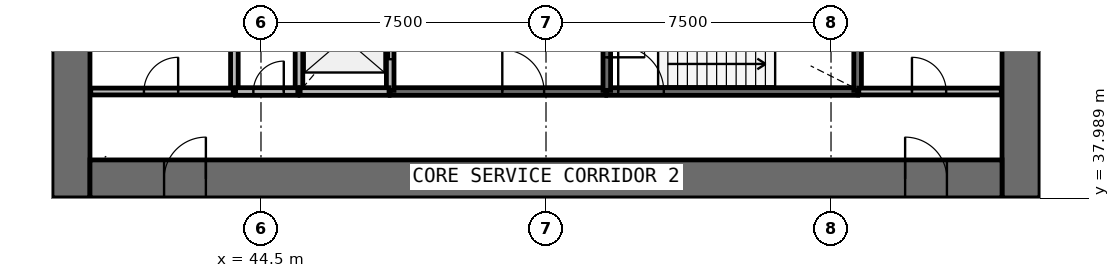
"""IFC4 building model, lengths in metres.
Left out: names, types, materials, properties, quantities, classifications, styles, units other than length and angle.
Written with IfcOpenShell. Run it as: python <this file> out.ifc"""

import sys

from ifc_helpers import new_model, si_unit, direction, frame, frame_2d, origin, place, context, subcontext, project, spatial, rectangle, extrude, source, transform, mapped, element, fill, save


model = new_model("IFC4")
c1 = context("Model", 3, precision=1e-05, world=origin(), true_north=direction((0.0, 1.0)))
c2 = subcontext(c1, "Body", "Model", "MODEL_VIEW")
j1 = project(units=[si_unit("LENGTHUNIT", "METRE"), si_unit("PLANEANGLEUNIT", "RADIAN")], contexts=[c1])
p1 = place(None, origin())
s1 = spatial("IfcSite", under=j1, at=p1, CompositionType="ELEMENT")
p2 = place(p1, origin())
s2 = spatial("IfcBuilding", under=s1, at=p2, CompositionType="ELEMENT")
p3 = place(p2, frame((0.0, 0.0, 57.8)))
s3 = spatial("IfcBuildingStorey", under=s2, at=p3, CompositionType="ELEMENT", Elevation=57.8)
p4 = place(p3, frame((64.5, 38.0, 0.0), z_axis=(0.0, 0.0, 1.0), x_axis=(0.0, 1.0, 0.0)))
e1 = element("IfcWall", 1, at=p4, inside=s3, PredefinedType="SHEAR", context=c2, shape_type="SweptSolid", body=[
    extrude(rectangle(XDim=20.0, YDim=1.0, at=frame_2d((10.0, 0.0))), origin(), (0.0, 0.0, 1.0), 4.4),
])
p5 = place(p4, frame((9.1, 0.0, 0.0)))
e2 = element("IfcOpeningElement", 2, at=p5, cuts=e1, PredefinedType="OPENING", context=c2, shape_type="SweptSolid", body=[
    extrude(rectangle(XDim=1.8, YDim=2.1, at=frame_2d((0.9, 1.05))), frame((0.0, 0.51, 0.0), z_axis=(0.0, -1.0, 0.0), x_axis=(1.0, 0.0, 0.0)), (0.0, 0.0, 1.0), 1.02),
])
p6 = place(p3, frame((39.5, 58.0, 0.0), z_axis=(0.0, 0.0, 1.0), x_axis=(0.0, -1.0, 0.0)))
e3 = element("IfcWall", 3, at=p6, inside=s3, PredefinedType="SHEAR", context=c2, shape_type="SweptSolid", body=[
    extrude(rectangle(XDim=20.0, YDim=1.0, at=frame_2d((10.0, 0.0))), origin(), (0.0, 0.0, 1.0), 4.4),
])
p7 = place(p6, frame((9.1, 0.0, 0.0)))
e4 = element("IfcOpeningElement", 4, at=p7, cuts=e3, PredefinedType="OPENING", context=c2, shape_type="SweptSolid", body=[
    extrude(rectangle(XDim=1.8, YDim=2.1, at=frame_2d((0.9, 1.05))), frame((0.0, 0.51, 0.0), z_axis=(0.0, -1.0, 0.0), x_axis=(1.0, 0.0, 0.0)), (0.0, 0.0, 1.0), 1.02),
])
p8 = place(p3, frame((40.0, 38.5, 0.0), z_axis=(0.0, 0.0, 1.0), x_axis=(1.0, 0.0, 0.0)))
e5 = element("IfcWall", 5, at=p8, inside=s3, PredefinedType="SHEAR", context=c2, shape_type="SweptSolid", body=[
    extrude(rectangle(XDim=24.0, YDim=1.0, at=frame_2d((12.0, 0.0))), origin(), (0.0, 0.0, 1.0), 4.4),
])
p9 = place(p8, frame((21.45, 0.0, 0.0)))
e6 = element("IfcOpeningElement", 6, at=p9, cuts=e5, PredefinedType="OPENING", context=c2, shape_type="SweptSolid", body=[
    extrude(rectangle(XDim=1.1, YDim=2.1, at=frame_2d((0.55, 1.05))), frame((0.0, 0.51, 0.0), z_axis=(0.0, -1.0, 0.0), x_axis=(1.0, 0.0, 0.0)), (0.0, 0.0, 1.0), 1.02),
])
p10 = place(p8, frame((1.95, 0.0, 0.0)))
e7 = element("IfcOpeningElement", 7, at=p10, cuts=e5, PredefinedType="OPENING", context=c2, shape_type="SweptSolid", body=[
    extrude(rectangle(XDim=1.1, YDim=2.1, at=frame_2d((0.55, 1.05))), frame((0.0, 0.51, 0.0), z_axis=(0.0, -1.0, 0.0), x_axis=(1.0, 0.0, 0.0)), (0.0, 0.0, 1.0), 1.02),
])
p11 = place(p3, frame((53.6, 40.8, 0.0), z_axis=(0.0, 0.0, 1.0), x_axis=(1.0, 0.0, 0.0)))
e8 = element("IfcWall", 8, at=p11, inside=s3, PredefinedType="SOLIDWALL", context=c2, shape_type="SweptSolid", body=[
    extrude(rectangle(XDim=6.6, YDim=0.2, at=frame_2d((3.3, 0.0))), origin(), (0.0, 0.0, 1.0), 3.95),
])
p12 = place(p11, frame((0.3, 0.0, 0.0)))
e9 = element("IfcOpeningElement", 9, at=p12, cuts=e8, PredefinedType="OPENING", context=c2, shape_type="SweptSolid", body=[
    extrude(rectangle(XDim=1.2, YDim=2.1, at=frame_2d((0.6, 1.05))), frame((0.0, 0.11, 0.0), z_axis=(0.0, -1.0, 0.0), x_axis=(1.0, 0.0, 0.0)), (0.0, 0.0, 1.0), 0.22),
])
p13 = place(p3, frame((47.9, 40.8, 0.0), z_axis=(0.0, 0.0, 1.0), x_axis=(1.0, 0.0, 0.0)))
e10 = element("IfcWall", 10, at=p13, inside=s3, PredefinedType="SOLIDWALL", context=c2, shape_type="SweptSolid", body=[
    extrude(rectangle(XDim=5.67, YDim=0.2, at=frame_2d((2.835, 0.0))), origin(), (0.0, 0.0, 1.0), 3.95),
])
p14 = place(p13, frame((2.95, 0.0, 0.0)))
e11 = element("IfcOpeningElement", 11, at=p14, cuts=e10, PredefinedType="OPENING", context=c2, shape_type="SweptSolid", body=[
    extrude(rectangle(XDim=1.1, YDim=2.1, at=frame_2d((0.55, 1.05))), frame((0.0, 0.11, 0.0), z_axis=(0.0, -1.0, 0.0), x_axis=(1.0, 0.0, 0.0)), (0.0, 0.0, 1.0), 0.22),
])
for number, where, z_axis, x_axis in (
    (12, (43.8, 43.6, 0.0), (0.0, 0.0, 1.0), (0.0, -1.0, 0.0)),
    (13, (45.5, 43.6, 0.0), (0.0, 0.0, 1.0), (0.0, -1.0, 0.0)),
):
    element("IfcWall", number, at=place(p3, frame(where, z_axis=z_axis, x_axis=x_axis)), inside=s3, PredefinedType="SOLIDWALL", context=c2, shape_type="SweptSolid", body=[
        extrude(rectangle(XDim=2.8, YDim=0.2, at=frame_2d((1.4, 0.0))), origin(), (0.0, 0.0, 1.0), 3.95),
    ])
p15 = place(p3, frame((47.9, 40.83, 0.0), z_axis=(0.0, 0.0, 1.0), x_axis=(0.0, 1.0, 0.0)))
e14 = element("IfcWall", 14, at=p15, inside=s3, PredefinedType="SOLIDWALL", context=c2, shape_type="SweptSolid", body=[
    extrude(rectangle(XDim=2.77, YDim=0.2, at=frame_2d((1.385, 0.0))), origin(), (0.0, 0.0, 1.0), 3.95),
])
p16 = place(p15, frame((0.82, 0.0, 0.0)))
e15 = element("IfcOpeningElement", 15, at=p16, cuts=e14, PredefinedType="OPENING", context=c2, shape_type="SweptSolid", body=[
    extrude(rectangle(XDim=1.1, YDim=2.1, at=frame_2d((0.55, 1.05))), frame((0.0, 0.11, 0.0), z_axis=(0.0, -1.0, 0.0), x_axis=(1.0, 0.0, 0.0)), (0.0, 0.0, 1.0), 0.22),
])
p17 = place(p3, frame((60.2, 40.83, 0.0), z_axis=(0.0, 0.0, 1.0), x_axis=(0.0, 1.0, 0.0)))
e16 = element("IfcWall", 16, at=p17, inside=s3, PredefinedType="SOLIDWALL", context=c2, shape_type="SweptSolid", body=[
    extrude(rectangle(XDim=2.77, YDim=0.2, at=frame_2d((1.385, 0.0))), origin(), (0.0, 0.0, 1.0), 3.95),
])
p18 = place(p3, frame((53.6, 43.6, 0.0), z_axis=(0.0, 0.0, 1.0), x_axis=(0.0, -1.0, 0.0)))
e17 = element("IfcWall", 17, at=p18, inside=s3, PredefinedType="SOLIDWALL", context=c2, shape_type="SweptSolid", body=[
    extrude(rectangle(XDim=2.77, YDim=0.2, at=frame_2d((1.385, 0.0))), origin(), (0.0, 0.0, 1.0), 3.95),
])
p19 = place(p18, frame((0.9, 0.0, 0.0)))
e18 = element("IfcOpeningElement", 18, at=p19, cuts=e17, PredefinedType="OPENING", context=c2, shape_type="SweptSolid", body=[
    extrude(rectangle(XDim=1.0, YDim=2.1, at=frame_2d((0.5, 1.05))), frame((0.0, 0.11, 0.0), z_axis=(0.0, -1.0, 0.0), x_axis=(1.0, 0.0, 0.0)), (0.0, 0.0, 1.0), 0.22),
])
p20 = place(p3, frame((45.53, 40.8, 0.0), z_axis=(0.0, 0.0, 1.0), x_axis=(1.0, 0.0, 0.0)))
e19 = element("IfcWall", 19, at=p20, inside=s3, PredefinedType="SOLIDWALL", context=c2, shape_type="SweptSolid", body=[
    extrude(rectangle(XDim=2.34, YDim=0.2, at=frame_2d((1.17, 0.0))), origin(), (0.0, 0.0, 1.0), 3.95),
])
p21 = place(p3, frame((43.83, 40.8, 0.0), z_axis=(0.0, 0.0, 1.0), x_axis=(1.0, 0.0, 0.0)))
e20 = element("IfcWall", 20, at=p21, inside=s3, PredefinedType="SOLIDWALL", context=c2, shape_type="SweptSolid", body=[
    extrude(rectangle(XDim=1.64, YDim=0.2, at=frame_2d((0.82, 0.0))), origin(), (0.0, 0.0, 1.0), 3.95),
])
p22 = place(p21, frame((0.47, 0.0, 0.0)))
e21 = element("IfcOpeningElement", 21, at=p22, cuts=e20, PredefinedType="OPENING", context=c2, shape_type="SweptSolid", body=[
    extrude(rectangle(XDim=0.8, YDim=2.1, at=frame_2d((0.4, 1.05))), frame((0.0, 0.11, 0.0), z_axis=(0.0, -1.0, 0.0), x_axis=(1.0, 0.0, 0.0)), (0.0, 0.0, 1.0), 0.22),
])
p23 = place(p3, frame((40.02, 40.8, 0.0), z_axis=(0.0, 0.0, 1.0), x_axis=(1.0, 0.0, 0.0)))
e22 = element("IfcWall", 22, at=p23, inside=s3, PredefinedType="PARTITIONING", context=c2, shape_type="SweptSolid", body=[
    extrude(rectangle(XDim=3.75, YDim=0.18, at=frame_2d((1.875, 0.0))), origin(), (0.0, 0.0, 1.0), 3.95),
])
p24 = place(p23, frame((1.4, 0.0, 0.0)))
e23 = element("IfcOpeningElement", 23, at=p24, cuts=e22, PredefinedType="OPENING", context=c2, shape_type="SweptSolid", body=[
    extrude(rectangle(XDim=0.9, YDim=2.1, at=frame_2d((0.45, 1.05))), frame((0.0, 0.1, 0.0), z_axis=(0.0, -1.0, 0.0), x_axis=(1.0, 0.0, 0.0)), (0.0, 0.0, 1.0), 0.2),
])
p25 = place(p3, frame((60.23, 40.8, 0.0), z_axis=(0.0, 0.0, 1.0), x_axis=(1.0, 0.0, 0.0)))
e24 = element("IfcWall", 24, at=p25, inside=s3, PredefinedType="PARTITIONING", context=c2, shape_type="SweptSolid", body=[
    extrude(rectangle(XDim=3.75, YDim=0.18, at=frame_2d((1.875, 0.0))), origin(), (0.0, 0.0, 1.0), 3.95),
])
p26 = place(p25, frame((1.4, 0.0, 0.0)))
e25 = element("IfcOpeningElement", 25, at=p26, cuts=e24, PredefinedType="OPENING", context=c2, shape_type="SweptSolid", body=[
    extrude(rectangle(XDim=0.9, YDim=2.1, at=frame_2d((0.45, 1.05))), frame((0.0, 0.1, 0.0), z_axis=(0.0, -1.0, 0.0), x_axis=(1.0, 0.0, 0.0)), (0.0, 0.0, 1.0), 0.2),
])
m1 = source(origin(), c2, "Body", "SweptSolid", [
    extrude(rectangle(XDim=1.1, YDim=2.1, at=frame_2d((0.55, 1.05))), frame((0.0, 0.025, 0.0), z_axis=(0.0, -1.0, 0.0), x_axis=(1.0, 0.0, 0.0)), (0.0, 0.0, 1.0), 0.05),
])
p27 = place(p16, origin())
e26 = element("IfcDoor", 26, at=p27, inside=s3, OperationType="DOUBLE_DOOR_SLIDING", PredefinedType="USERDEFINED", context=c2, shape_type="MappedRepresentation", body=[
    mapped(m1, transform((0.0, 0.0, 0.0), scale=1.0)),
])
fill(e15, e26)
m2 = source(origin(), c2, "Body", "SweptSolid", [
    extrude(rectangle(XDim=1.2, YDim=2.1, at=frame_2d((0.6, 1.05))), frame((0.0, 0.025, 0.0), z_axis=(0.0, -1.0, 0.0), x_axis=(1.0, 0.0, 0.0)), (0.0, 0.0, 1.0), 0.05),
])
p28 = place(p12, origin())
e27 = element("IfcDoor", 27, at=p28, inside=s3, OperationType="SINGLE_SWING_LEFT", PredefinedType="DOOR", context=c2, shape_type="MappedRepresentation", body=[
    mapped(m2, transform((0.0, 0.0, 0.0), scale=1.0)),
])
fill(e9, e27)
m3 = source(origin(), c2, "Body", "SweptSolid", [
    extrude(rectangle(XDim=1.0, YDim=2.1, at=frame_2d((0.5, 1.05))), frame((0.0, 0.025, 0.0), z_axis=(0.0, -1.0, 0.0), x_axis=(1.0, 0.0, 0.0)), (0.0, 0.0, 1.0), 0.05),
])
p29 = place(p19, origin())
e28 = element("IfcDoor", 28, at=p29, inside=s3, OperationType="SINGLE_SWING_RIGHT", PredefinedType="DOOR", context=c2, shape_type="MappedRepresentation", body=[
    mapped(m3, transform((0.0, 0.0, 0.0), scale=1.0)),
])
fill(e18, e28)
m4 = source(origin(), c2, "Body", "SweptSolid", [
    extrude(rectangle(XDim=1.1, YDim=2.1, at=frame_2d((0.55, 1.05))), frame((0.0, 0.025, 0.0), z_axis=(0.0, -1.0, 0.0), x_axis=(1.0, 0.0, 0.0)), (0.0, 0.0, 1.0), 0.05),
])
p30 = place(p14, origin())
e29 = element("IfcDoor", 29, at=p30, inside=s3, OperationType="SINGLE_SWING_LEFT", PredefinedType="DOOR", context=c2, shape_type="MappedRepresentation", body=[
    mapped(m4, transform((0.0, 0.0, 0.0), scale=1.0)),
])
fill(e11, e29)
m5 = source(origin(), c2, "Body", "SweptSolid", [
    extrude(rectangle(XDim=0.8, YDim=2.1, at=frame_2d((0.4, 1.05))), frame((0.0, 0.025, 0.0), z_axis=(0.0, -1.0, 0.0), x_axis=(1.0, 0.0, 0.0)), (0.0, 0.0, 1.0), 0.05),
])
p31 = place(p22, origin())
e30 = element("IfcDoor", 30, at=p31, inside=s3, OperationType="SINGLE_SWING_RIGHT", PredefinedType="DOOR", context=c2, shape_type="MappedRepresentation", body=[
    mapped(m5, transform((0.0, 0.0, 0.0), scale=1.0)),
])
fill(e21, e30)
m6 = source(origin(), c2, "Body", "SweptSolid", [
    extrude(rectangle(XDim=1.1, YDim=2.1, at=frame_2d((0.55, 1.05))), frame((0.0, 0.025, 0.0), z_axis=(0.0, -1.0, 0.0), x_axis=(1.0, 0.0, 0.0)), (0.0, 0.0, 1.0), 0.05),
])
p32 = place(p9, origin())
e31 = element("IfcDoor", 31, at=p32, inside=s3, OperationType="SINGLE_SWING_LEFT", PredefinedType="DOOR", context=c2, shape_type="MappedRepresentation", body=[
    mapped(m6, transform((0.0, 0.0, 0.0), scale=1.0)),
])
fill(e6, e31)
p33 = place(p10, origin())
e32 = element("IfcDoor", 32, at=p33, inside=s3, OperationType="SINGLE_SWING_RIGHT", PredefinedType="DOOR", context=c2, shape_type="MappedRepresentation", body=[
    mapped(m6, transform((0.0, 0.0, 0.0), scale=1.0)),
])
fill(e7, e32)
m7 = source(origin(), c2, "Body", "SweptSolid", [
    extrude(rectangle(XDim=0.9, YDim=2.1, at=frame_2d((0.45, 1.05))), frame((0.0, 0.025, 0.0), z_axis=(0.0, -1.0, 0.0), x_axis=(1.0, 0.0, 0.0)), (0.0, 0.0, 1.0), 0.05),
])
p34 = place(p24, origin())
e33 = element("IfcDoor", 33, at=p34, inside=s3, OperationType="SINGLE_SWING_RIGHT", PredefinedType="DOOR", context=c2, shape_type="MappedRepresentation", body=[
    mapped(m7, transform((0.0, 0.0, 0.0), scale=1.0)),
])
fill(e23, e33)
p35 = place(p26, origin())
e34 = element("IfcDoor", 34, at=p35, inside=s3, OperationType="SINGLE_SWING_LEFT", PredefinedType="DOOR", context=c2, shape_type="MappedRepresentation", body=[
    mapped(m7, transform((0.0, 0.0, 0.0), scale=1.0)),
])
fill(e25, e34)
save(model, sys.argv[1])
